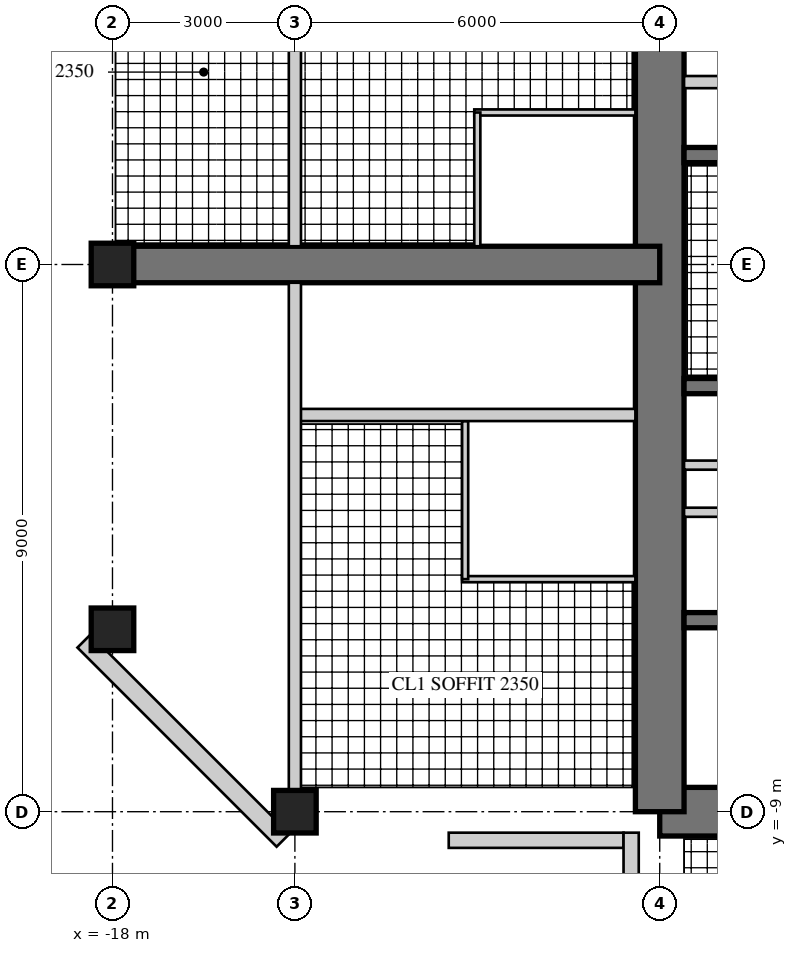
"""IFC4 building model, lengths in metres.
Left out: names, types, materials, properties, quantities, classifications, styles, units other than length and angle.
Written with IfcOpenShell. Run it as: python <this file> out.ifc"""

import sys

from ifc_helpers import new_model, si_unit, direction, frame, frame_2d, origin, origin_2d, place, context, subcontext, project, spatial, rectangle, hollow_rectangle, extrude, element, fill, save


model = new_model("IFC4")
c1 = context("Model", 3, precision=1e-05, world=origin(), true_north=direction((0.0, 1.0)))
c2 = subcontext(c1, "Body", "Model", "MODEL_VIEW")
j1 = project(units=[si_unit("LENGTHUNIT", "METRE"), si_unit("PLANEANGLEUNIT", "RADIAN")], contexts=[c1])
p1 = place(None, origin())
s1 = spatial("IfcSite", under=j1, at=p1, CompositionType="ELEMENT")
p2 = place(p1, origin())
s2 = spatial("IfcBuilding", under=s1, at=p2, CompositionType="ELEMENT")
p3 = place(p2, frame((0.0, 0.0, 267.9)))
s3 = spatial("IfcBuildingStorey", under=s2, at=p3, CompositionType="ELEMENT", Elevation=267.9)
p4 = place(p3, frame((-9.0, -9.0, 0.0), z_axis=(0.0, 0.0, 1.0), x_axis=(1.0, 0.0, 0.0)))
e1 = element("IfcWall", 1, at=p4, inside=s3, PredefinedType="SHEAR", context=c2, shape_type="SweptSolid", body=[
    extrude(rectangle(XDim=18.0, YDim=0.8, at=frame_2d((9.0, 0.0))), origin(), (0.0, 0.0, 1.0), 3.4),
])
p5 = place(p4, frame((9.8, 0.0, 0.0)))
e2 = element("IfcOpeningElement", 2, at=p5, cuts=e1, PredefinedType="OPENING", context=c2, shape_type="SweptSolid", body=[
    extrude(rectangle(XDim=1.0, YDim=2.4, at=frame_2d((0.5, 1.2))), frame((0.0, 0.41, 0.0), z_axis=(0.0, -1.0, 0.0), x_axis=(1.0, 0.0, 0.0)), (0.0, 0.0, 1.0), 0.82),
])
p6 = place(p3, frame((-9.0, 9.0, 0.0), z_axis=(0.0, 0.0, 1.0), x_axis=(0.0, -1.0, 0.0)))
e3 = element("IfcWall", 3, at=p6, inside=s3, PredefinedType="SHEAR", context=c2, shape_type="SweptSolid", body=[
    extrude(rectangle(XDim=18.0, YDim=0.8, at=frame_2d((9.0, 0.0))), origin(), (0.0, 0.0, 1.0), 3.4),
])
p7 = place(p6, frame((9.8, 0.0, 0.0)))
e4 = element("IfcOpeningElement", 4, at=p7, cuts=e3, PredefinedType="OPENING", context=c2, shape_type="SweptSolid", body=[
    extrude(rectangle(XDim=1.0, YDim=2.4, at=frame_2d((0.5, 1.2))), frame((0.0, 0.41, 0.0), z_axis=(0.0, -1.0, 0.0), x_axis=(1.0, 0.0, 0.0)), (0.0, 0.0, 1.0), 0.82),
])
p8 = place(p3, frame((-2.125, 1.8, 0.0), z_axis=(0.0, 0.0, 1.0), x_axis=(-1.0, 0.0, 0.0)))
e5 = element("IfcWall", 5, at=p8, inside=s3, PredefinedType="SHEAR", context=c2, shape_type="SweptSolid", body=[
    extrude(rectangle(XDim=6.475, YDim=0.25, at=frame_2d((3.238, 0.0))), origin(), (0.0, 0.0, 1.0), 3.4),
])
p9 = place(p3, frame((-5.725, 3.0, 0.0), z_axis=(0.0, 0.0, 1.0), x_axis=(-1.0, 0.0, 0.0)))
e6 = element("IfcWall", 6, at=p9, inside=s3, PredefinedType="PARTITIONING", context=c2, shape_type="SweptSolid", body=[
    extrude(rectangle(XDim=2.875, YDim=0.2, at=frame_2d((1.438, 0.0))), origin(), (0.0, 0.0, 1.0), 3.4),
])
p10 = place(p3, frame((-1.925, -2.0, 0.0), z_axis=(0.0, 0.0, 1.0), x_axis=(-1.0, 0.0, 0.0)))
e7 = element("IfcWall", 7, at=p10, inside=s3, PredefinedType="SHEAR", context=c2, shape_type="SweptSolid", body=[
    extrude(rectangle(XDim=6.675, YDim=0.25, at=frame_2d((3.337, 0.0))), origin(), (0.0, 0.0, 1.0), 3.4),
])
p11 = place(p3, frame((-1.925, -5.85, 0.0), z_axis=(0.0, 0.0, 1.0), x_axis=(-1.0, 0.0, 0.0)))
e8 = element("IfcWall", 8, at=p11, inside=s3, PredefinedType="SHEAR", context=c2, shape_type="SweptSolid", body=[
    extrude(rectangle(XDim=6.675, YDim=0.25, at=frame_2d((3.337, 0.0))), origin(), (0.0, 0.0, 1.0), 3.4),
])
p12 = place(p11, frame((0.496, 0.0, 0.0)))
e9 = element("IfcOpeningElement", 9, at=p12, cuts=e8, PredefinedType="OPENING", context=c2, shape_type="SweptSolid", body=[
    extrude(rectangle(XDim=1.1, YDim=2.2, at=frame_2d((0.55, 1.1))), frame((0.0, 0.135, 0.0), z_axis=(0.0, -1.0, 0.0), x_axis=(1.0, 0.0, 0.0)), (0.0, 0.0, 1.0), 0.27),
])
p13 = place(p11, frame((2.788, 0.0, 0.0)))
e10 = element("IfcOpeningElement", 10, at=p13, cuts=e8, PredefinedType="OPENING", context=c2, shape_type="SweptSolid", body=[
    extrude(rectangle(XDim=1.1, YDim=2.2, at=frame_2d((0.55, 1.1))), frame((0.0, 0.135, 0.0), z_axis=(0.0, -1.0, 0.0), x_axis=(1.0, 0.0, 0.0)), (0.0, 0.0, 1.0), 0.27),
])
p14 = place(p11, frame((5.079, 0.0, 0.0)))
e11 = element("IfcOpeningElement", 11, at=p14, cuts=e8, PredefinedType="OPENING", context=c2, shape_type="SweptSolid", body=[
    extrude(rectangle(XDim=1.1, YDim=2.2, at=frame_2d((0.55, 1.1))), frame((0.0, 0.135, 0.0), z_axis=(0.0, -1.0, 0.0), x_axis=(1.0, 0.0, 0.0)), (0.0, 0.0, 1.0), 0.27),
])
p15 = place(p3, frame((-1.925, -3.3, 0.0), z_axis=(0.0, 0.0, 1.0), x_axis=(-1.0, 0.0, 0.0)))
e12 = element("IfcWall", 12, at=p15, inside=s3, PredefinedType="PARTITIONING", context=c2, shape_type="SweptSolid", body=[
    extrude(rectangle(XDim=6.675, YDim=0.15, at=frame_2d((3.337, 0.0))), origin(), (0.0, 0.0, 1.0), 3.4),
])
p16 = place(p15, frame((0.075, 0.0, 0.0)))
e13 = element("IfcOpeningElement", 13, at=p16, cuts=e12, PredefinedType="OPENING", context=c2, shape_type="SweptSolid", body=[
    extrude(rectangle(XDim=0.8, YDim=2.1, at=frame_2d((0.4, 1.05))), frame((0.0, 0.085, 0.0), z_axis=(0.0, -1.0, 0.0), x_axis=(1.0, 0.0, 0.0)), (0.0, 0.0, 1.0), 0.17),
])
p17 = place(p15, frame((3.675, 0.0, 0.0)))
e14 = element("IfcOpeningElement", 14, at=p17, cuts=e12, PredefinedType="OPENING", context=c2, shape_type="SweptSolid", body=[
    extrude(rectangle(XDim=0.8, YDim=2.1, at=frame_2d((0.4, 1.05))), frame((0.0, 0.085, 0.0), z_axis=(0.0, -1.0, 0.0), x_axis=(1.0, 0.0, 0.0)), (0.0, 0.0, 1.0), 0.17),
])
p18 = place(p3, frame((-9.0, 0.0, 0.0), z_axis=(0.0, 0.0, 1.0), x_axis=(-1.0, 0.0, 0.0)))
e15 = element("IfcWall", 15, at=p18, inside=s3, PredefinedType="SHEAR", context=c2, shape_type="SweptSolid", body=[
    extrude(rectangle(XDim=9.0, YDim=0.6, at=frame_2d((4.5, 0.0))), origin(), (0.0, 0.0, 1.0), 3.4),
])
p19 = place(p18, frame((3.8, 0.0, 0.0)))
e16 = element("IfcOpeningElement", 16, at=p19, cuts=e15, PredefinedType="OPENING", context=c2, shape_type="SweptSolid", body=[
    extrude(rectangle(XDim=1.0, YDim=2.15, at=frame_2d((0.5, 1.075))), frame((0.0, 0.31, 0.0), z_axis=(0.0, -1.0, 0.0), x_axis=(1.0, 0.0, 0.0)), (0.0, 0.0, 1.0), 0.62),
])
p20 = place(p18, frame((7.0, 0.0, 0.0)))
e17 = element("IfcOpeningElement", 17, at=p20, cuts=e15, PredefinedType="OPENING", context=c2, shape_type="SweptSolid", body=[
    extrude(rectangle(XDim=1.0, YDim=2.2, at=frame_2d((0.5, 1.1))), frame((0.0, 0.31, 0.0), z_axis=(0.0, -1.0, 0.0), x_axis=(1.0, 0.0, 0.0)), (0.0, 0.0, 1.0), 0.62),
])
for number, where, z_axis, x_axis in (
    (18, (-15.0, -9.0, 0.0), (0.0, 0.0, 1.0), (1.0, 0.0, 0.0)),
    (19, (-18.0, 0.0, 0.0), (0.0, 0.0, 1.0), (1.0, 0.0, 0.0)),
    (20, (-18.0, -6.0, 0.0), (0.0, 0.0, 1.0), (1.0, 0.0, 0.0)),
):
    element("IfcColumn", number, at=place(p3, frame(where, z_axis=z_axis, x_axis=x_axis)), inside=s3, PredefinedType="COLUMN", context=c2, shape_type="SweptSolid", body=[
        extrude(rectangle(XDim=0.7, YDim=0.7, at=origin_2d()), origin(), (0.0, 0.0, 1.0), 3.4),
    ])
p21 = place(p3, frame((-18.47, -6.195, 0.0), z_axis=(0.0, 0.0, 1.0), x_axis=(0.707106781187, -0.707106781187, 0.0)))
e21 = element("IfcWall", 21, at=p21, inside=s3, PredefinedType="SOLIDWALL", context=c2, shape_type="SweptSolid", body=[
    extrude(rectangle(XDim=4.632, YDim=0.3, at=frame_2d((2.316, 0.0))), origin(), (0.0, 0.0, 1.0), 3.22),
])
p22 = place(p21, frame((1.866, 0.0, 0.3)))
e22 = element("IfcOpeningElement", 22, at=p22, cuts=e21, PredefinedType="OPENING", context=c2, shape_type="SweptSolid", body=[
    extrude(rectangle(XDim=0.9, YDim=2.4, at=frame_2d((0.45, 1.2))), frame((0.0, 0.16, 0.0), z_axis=(0.0, -1.0, 0.0), x_axis=(1.0, 0.0, 0.0)), (0.0, 0.0, 1.0), 0.32),
])
p23 = place(p3, frame((-12.47, -9.47, 0.0), z_axis=(0.0, 0.0, 1.0), x_axis=(1.0, 0.0, 0.0)))
e23 = element("IfcWall", 23, at=p23, inside=s3, PredefinedType="SOLIDWALL", context=c2, shape_type="SweptSolid", body=[
    extrude(rectangle(XDim=2.875, YDim=0.25, at=frame_2d((1.438, 0.0))), origin(), (0.0, 0.0, 1.0), 3.22),
])
p24 = place(p23, frame((0.6, 0.0, 0.0)))
e24 = element("IfcOpeningElement", 24, at=p24, cuts=e23, PredefinedType="OPENING", context=c2, shape_type="SweptSolid", body=[
    extrude(rectangle(XDim=1.0, YDim=2.2, at=frame_2d((0.5, 1.1))), frame((0.0, 0.135, 0.0), z_axis=(0.0, -1.0, 0.0), x_axis=(1.0, 0.0, 0.0)), (0.0, 0.0, 1.0), 0.27),
])
p25 = place(p3, frame((-9.47, -9.345, 0.0), z_axis=(0.0, 0.0, 1.0), x_axis=(0.0, -1.0, 0.0)))
e25 = element("IfcWall", 25, at=p25, inside=s3, PredefinedType="SOLIDWALL", context=c2, shape_type="SweptSolid", body=[
    extrude(rectangle(XDim=3.125, YDim=0.25, at=frame_2d((1.562, 0.0))), origin(), (0.0, 0.0, 1.0), 3.22),
])
p26 = place(p25, frame((0.6, 0.0, 0.0)))
e26 = element("IfcOpeningElement", 26, at=p26, cuts=e25, PredefinedType="OPENING", context=c2, shape_type="SweptSolid", body=[
    extrude(rectangle(XDim=1.0, YDim=2.2, at=frame_2d((0.5, 1.1))), frame((0.0, 0.135, 0.0), z_axis=(0.0, -1.0, 0.0), x_axis=(1.0, 0.0, 0.0)), (0.0, 0.0, 1.0), 0.27),
])
p27 = place(p3, frame((-3.325, -4.075, 0.0), z_axis=(0.0, 0.0, 1.0), x_axis=(-1.0, 0.0, 0.0)))
e27 = element("IfcWall", 27, at=p27, inside=s3, PredefinedType="PARTITIONING", context=c2, shape_type="SweptSolid", body=[
    extrude(rectangle(XDim=5.275, YDim=0.15, at=frame_2d((2.638, 0.0))), origin(), (0.0, 0.0, 1.0), 3.22),
])
p28 = place(p27, frame((2.137, 0.0, 0.0)))
e28 = element("IfcOpeningElement", 28, at=p28, cuts=e27, PredefinedType="OPENING", context=c2, shape_type="SweptSolid", body=[
    extrude(rectangle(XDim=1.0, YDim=2.1, at=frame_2d((0.5, 1.05))), frame((0.0, 0.085, 0.0), z_axis=(0.0, -1.0, 0.0), x_axis=(1.0, 0.0, 0.0)), (0.0, 0.0, 1.0), 0.17),
])
p29 = place(p3, frame((-9.4, -5.175, 0.0), z_axis=(0.0, 0.0, 1.0), x_axis=(-1.0, 0.0, 0.0)))
e29 = element("IfcWall", 29, at=p29, inside=s3, PredefinedType="PARTITIONING", context=c2, shape_type="SweptSolid", body=[
    extrude(rectangle(XDim=2.85, YDim=0.1, at=frame_2d((1.425, 0.0))), origin(), (0.0, 0.0, 1.0), 3.22),
])
p30 = place(p3, frame((-12.2, -2.575, 0.0), z_axis=(0.0, 0.0, 1.0), x_axis=(0.0, -1.0, 0.0)))
e30 = element("IfcWall", 30, at=p30, inside=s3, PredefinedType="PARTITIONING", context=c2, shape_type="SweptSolid", body=[
    extrude(rectangle(XDim=2.6, YDim=0.1, at=frame_2d((1.3, 0.0))), origin(), (0.0, 0.0, 1.0), 3.22),
])
p31 = place(p30, frame((0.55, 0.0, 0.0)))
e31 = element("IfcOpeningElement", 31, at=p31, cuts=e30, PredefinedType="OPENING", context=c2, shape_type="SweptSolid", body=[
    extrude(rectangle(XDim=0.9, YDim=2.1, at=frame_2d((0.45, 1.05))), frame((0.0, 0.06, 0.0), z_axis=(0.0, -1.0, 0.0), x_axis=(1.0, 0.0, 0.0)), (0.0, 0.0, 1.0), 0.12),
])
p32 = place(p3, frame((-9.4, 2.5, 0.0), z_axis=(0.0, 0.0, 1.0), x_axis=(-1.0, 0.0, 0.0)))
e32 = element("IfcWall", 32, at=p32, inside=s3, PredefinedType="PARTITIONING", context=c2, shape_type="SweptSolid", body=[
    extrude(rectangle(XDim=2.65, YDim=0.1, at=frame_2d((1.325, 0.0))), origin(), (0.0, 0.0, 1.0), 3.22),
])
p33 = place(p3, frame((-12.0, 2.5, 0.0), z_axis=(0.0, 0.0, 1.0), x_axis=(0.0, -1.0, 0.0)))
e33 = element("IfcWall", 33, at=p33, inside=s3, PredefinedType="PARTITIONING", context=c2, shape_type="SweptSolid", body=[
    extrude(rectangle(XDim=2.2, YDim=0.1, at=frame_2d((1.1, 0.0))), origin(), (0.0, 0.0, 1.0), 3.22),
])
p34 = place(p33, frame((0.55, 0.0, 0.0)))
e34 = element("IfcOpeningElement", 34, at=p34, cuts=e33, PredefinedType="OPENING", context=c2, shape_type="SweptSolid", body=[
    extrude(rectangle(XDim=0.9, YDim=2.1, at=frame_2d((0.45, 1.05))), frame((0.0, 0.06, 0.0), z_axis=(0.0, -1.0, 0.0), x_axis=(1.0, 0.0, 0.0)), (0.0, 0.0, 1.0), 0.12),
])
p35 = place(p3, frame((-9.4, -2.475, 0.0), z_axis=(0.0, 0.0, 1.0), x_axis=(-1.0, 0.0, 0.0)))
e35 = element("IfcWall", 35, at=p35, inside=s3, PredefinedType="SOLIDWALL", context=c2, shape_type="SweptSolid", body=[
    extrude(rectangle(XDim=5.6, YDim=0.2, at=frame_2d((2.8, 0.0))), origin(), (0.0, 0.0, 1.0), 3.22),
])
p36 = place(p35, frame((3.4, 0.0, 0.0)))
e36 = element("IfcOpeningElement", 36, at=p36, cuts=e35, PredefinedType="OPENING", context=c2, shape_type="SweptSolid", body=[
    extrude(rectangle(XDim=1.0, YDim=2.15, at=frame_2d((0.5, 1.075))), frame((0.0, 0.11, 0.0), z_axis=(0.0, -1.0, 0.0), x_axis=(1.0, 0.0, 0.0)), (0.0, 0.0, 1.0), 0.22),
])
p37 = place(p3, frame((-15.0, 8.65, 0.0), z_axis=(0.0, 0.0, 1.0), x_axis=(0.0, -1.0, 0.0)))
e37 = element("IfcWall", 37, at=p37, inside=s3, PredefinedType="SOLIDWALL", context=c2, shape_type="SweptSolid", body=[
    extrude(rectangle(XDim=8.35, YDim=0.2, at=frame_2d((4.175, 0.0))), origin(), (0.0, 0.0, 1.0), 2.52),
])
p38 = place(p3, frame((-15.0, -0.3, 0.0), z_axis=(0.0, 0.0, 1.0), x_axis=(0.0, -1.0, 0.0)))
e38 = element("IfcWall", 38, at=p38, inside=s3, PredefinedType="SOLIDWALL", context=c2, shape_type="SweptSolid", body=[
    extrude(rectangle(XDim=8.35, YDim=0.2, at=frame_2d((4.175, 0.0))), origin(), (0.0, 0.0, 1.0), 2.52),
])
p39 = place(p38, frame((0.4, 0.0, 0.0)))
e39 = element("IfcOpeningElement", 39, at=p39, cuts=e38, PredefinedType="OPENING", context=c2, shape_type="SweptSolid", body=[
    extrude(rectangle(XDim=1.0, YDim=2.2, at=frame_2d((0.5, 1.1))), frame((0.0, 0.11, 0.0), z_axis=(0.0, -1.0, 0.0), x_axis=(1.0, 0.0, 0.0)), (0.0, 0.0, 1.0), 0.22),
])
p40 = place(p22, origin())
e40 = element("IfcWindow", 40, at=p40, inside=s3, PartitioningType="SINGLE_PANEL", PredefinedType="WINDOW", context=c2, shape_type="SweptSolid", body=[
    extrude(hollow_rectangle(XDim=0.9, YDim=2.4, WallThickness=0.06, at=frame_2d((0.45, 1.2))), frame((0.0, 0.03, 0.0), z_axis=(0.0, -1.0, 0.0), x_axis=(1.0, 0.0, 0.0)), (0.0, 0.0, 1.0), 0.06),
    extrude(rectangle(XDim=0.779, YDim=2.279, at=frame_2d((0.45, 1.2))), frame((0.0, 0.03, 0.0), z_axis=(0.0, -1.0, 0.0), x_axis=(1.0, 0.0, 0.0)), (0.0, 0.0, 1.0), 0.06),
])
fill(e22, e40)
p41 = place(p24, origin())
e41 = element("IfcDoor", 41, at=p41, inside=s3, OperationType="SINGLE_SWING_RIGHT", PredefinedType="DOOR", context=c2, shape_type="SweptSolid", body=[
    extrude(hollow_rectangle(XDim=1.0, YDim=2.2, WallThickness=0.06, at=frame_2d((0.5, 1.1))), frame((0.0, 0.025, 0.0), z_axis=(0.0, -1.0, 0.0), x_axis=(1.0, 0.0, 0.0)), (0.0, 0.0, 1.0), 0.05),
    extrude(rectangle(XDim=0.879, YDim=2.079, at=frame_2d((0.5, 1.1))), frame((0.0, 0.025, 0.0), z_axis=(0.0, -1.0, 0.0), x_axis=(1.0, 0.0, 0.0)), (0.0, 0.0, 1.0), 0.05),
])
fill(e24, e41)
p42 = place(p26, origin())
e42 = element("IfcDoor", 42, at=p42, inside=s3, OperationType="SINGLE_SWING_LEFT", PredefinedType="DOOR", context=c2, shape_type="SweptSolid", body=[
    extrude(hollow_rectangle(XDim=1.0, YDim=2.2, WallThickness=0.06, at=frame_2d((0.5, 1.1))), frame((0.0, 0.025, 0.0), z_axis=(0.0, -1.0, 0.0), x_axis=(1.0, 0.0, 0.0)), (0.0, 0.0, 1.0), 0.05),
    extrude(rectangle(XDim=0.879, YDim=2.079, at=frame_2d((0.5, 1.1))), frame((0.0, 0.025, 0.0), z_axis=(0.0, -1.0, 0.0), x_axis=(1.0, 0.0, 0.0)), (0.0, 0.0, 1.0), 0.05),
])
fill(e26, e42)
p43 = place(p31, origin())
e43 = element("IfcDoor", 43, at=p43, inside=s3, OperationType="SINGLE_SWING_LEFT", PredefinedType="DOOR", context=c2, shape_type="SweptSolid", body=[
    extrude(rectangle(XDim=0.9, YDim=2.1, at=frame_2d((0.45, 1.05))), frame((0.0, 0.025, 0.0), z_axis=(0.0, -1.0, 0.0), x_axis=(1.0, 0.0, 0.0)), (0.0, 0.0, 1.0), 0.05),
])
fill(e31, e43)
p44 = place(p34, origin())
e44 = element("IfcDoor", 44, at=p44, inside=s3, OperationType="SINGLE_SWING_LEFT", PredefinedType="DOOR", context=c2, shape_type="SweptSolid", body=[
    extrude(rectangle(XDim=0.9, YDim=2.1, at=frame_2d((0.45, 1.05))), frame((0.0, 0.025, 0.0), z_axis=(0.0, -1.0, 0.0), x_axis=(1.0, 0.0, 0.0)), (0.0, 0.0, 1.0), 0.05),
])
fill(e34, e44)
p45 = place(p36, origin())
e45 = element("IfcDoor", 45, at=p45, inside=s3, OperationType="SINGLE_SWING_LEFT", PredefinedType="DOOR", context=c2, shape_type="SweptSolid", body=[
    extrude(rectangle(XDim=1.0, YDim=2.15, at=frame_2d((0.5, 1.075))), frame((0.0, 0.025, 0.0), z_axis=(0.0, -1.0, 0.0), x_axis=(1.0, 0.0, 0.0)), (0.0, 0.0, 1.0), 0.05),
])
fill(e36, e45)
p46 = place(p39, frame((1.0, 0.0, 0.0), z_axis=(0.0, 0.0, 1.0), x_axis=(-1.0, 0.0, 0.0)))
e46 = element("IfcDoor", 46, at=p46, inside=s3, OperationType="SINGLE_SWING_LEFT", PredefinedType="DOOR", context=c2, shape_type="SweptSolid", body=[
    extrude(rectangle(XDim=1.0, YDim=2.2, at=frame_2d((0.5, 1.1))), frame((0.0, 0.025, 0.0), z_axis=(0.0, -1.0, 0.0), x_axis=(1.0, 0.0, 0.0)), (0.0, 0.0, 1.0), 0.05),
])
fill(e39, e46)
p47 = place(p19, frame((1.0, 0.0, 0.0), z_axis=(0.0, 0.0, 1.0), x_axis=(-1.0, 0.0, 0.0)))
e47 = element("IfcDoor", 47, at=p47, inside=s3, OperationType="SINGLE_SWING_RIGHT", PredefinedType="DOOR", context=c2, shape_type="SweptSolid", body=[
    extrude(rectangle(XDim=1.0, YDim=2.15, at=frame_2d((0.5, 1.075))), frame((0.0, 0.025, 0.0), z_axis=(0.0, -1.0, 0.0), x_axis=(1.0, 0.0, 0.0)), (0.0, 0.0, 1.0), 0.05),
])
fill(e16, e47)
p48 = place(p20, origin())
e48 = element("IfcDoor", 48, at=p48, inside=s3, OperationType="SINGLE_SWING_LEFT", PredefinedType="DOOR", context=c2, shape_type="SweptSolid", body=[
    extrude(rectangle(XDim=1.0, YDim=2.2, at=frame_2d((0.5, 1.1))), frame((0.0, 0.025, 0.0), z_axis=(0.0, -1.0, 0.0), x_axis=(1.0, 0.0, 0.0)), (0.0, 0.0, 1.0), 0.05),
])
fill(e17, e48)
p49 = place(p7, origin())
e49 = element("IfcDoor", 49, at=p49, inside=s3, OperationType="SINGLE_SWING_RIGHT", PredefinedType="DOOR", context=c2, shape_type="SweptSolid", body=[
    extrude(rectangle(XDim=1.0, YDim=2.4, at=frame_2d((0.5, 1.2))), frame((0.0, 0.055, 0.0), z_axis=(0.0, -1.0, 0.0), x_axis=(1.0, 0.0, 0.0)), (0.0, 0.0, 1.0), 0.05),
])
fill(e4, e49)
p50 = place(p14, origin())
e50 = element("IfcDoor", 50, at=p50, inside=s3, OperationType="DOUBLE_DOOR_SLIDING", PredefinedType="DOOR", context=c2, shape_type="SweptSolid", body=[
    extrude(rectangle(XDim=1.1, YDim=2.2, at=frame_2d((0.55, 1.1))), frame((0.0, 0.025, 0.0), z_axis=(0.0, -1.0, 0.0), x_axis=(1.0, 0.0, 0.0)), (0.0, 0.0, 1.0), 0.05),
])
fill(e11, e50)
save(model, sys.argv[1])
